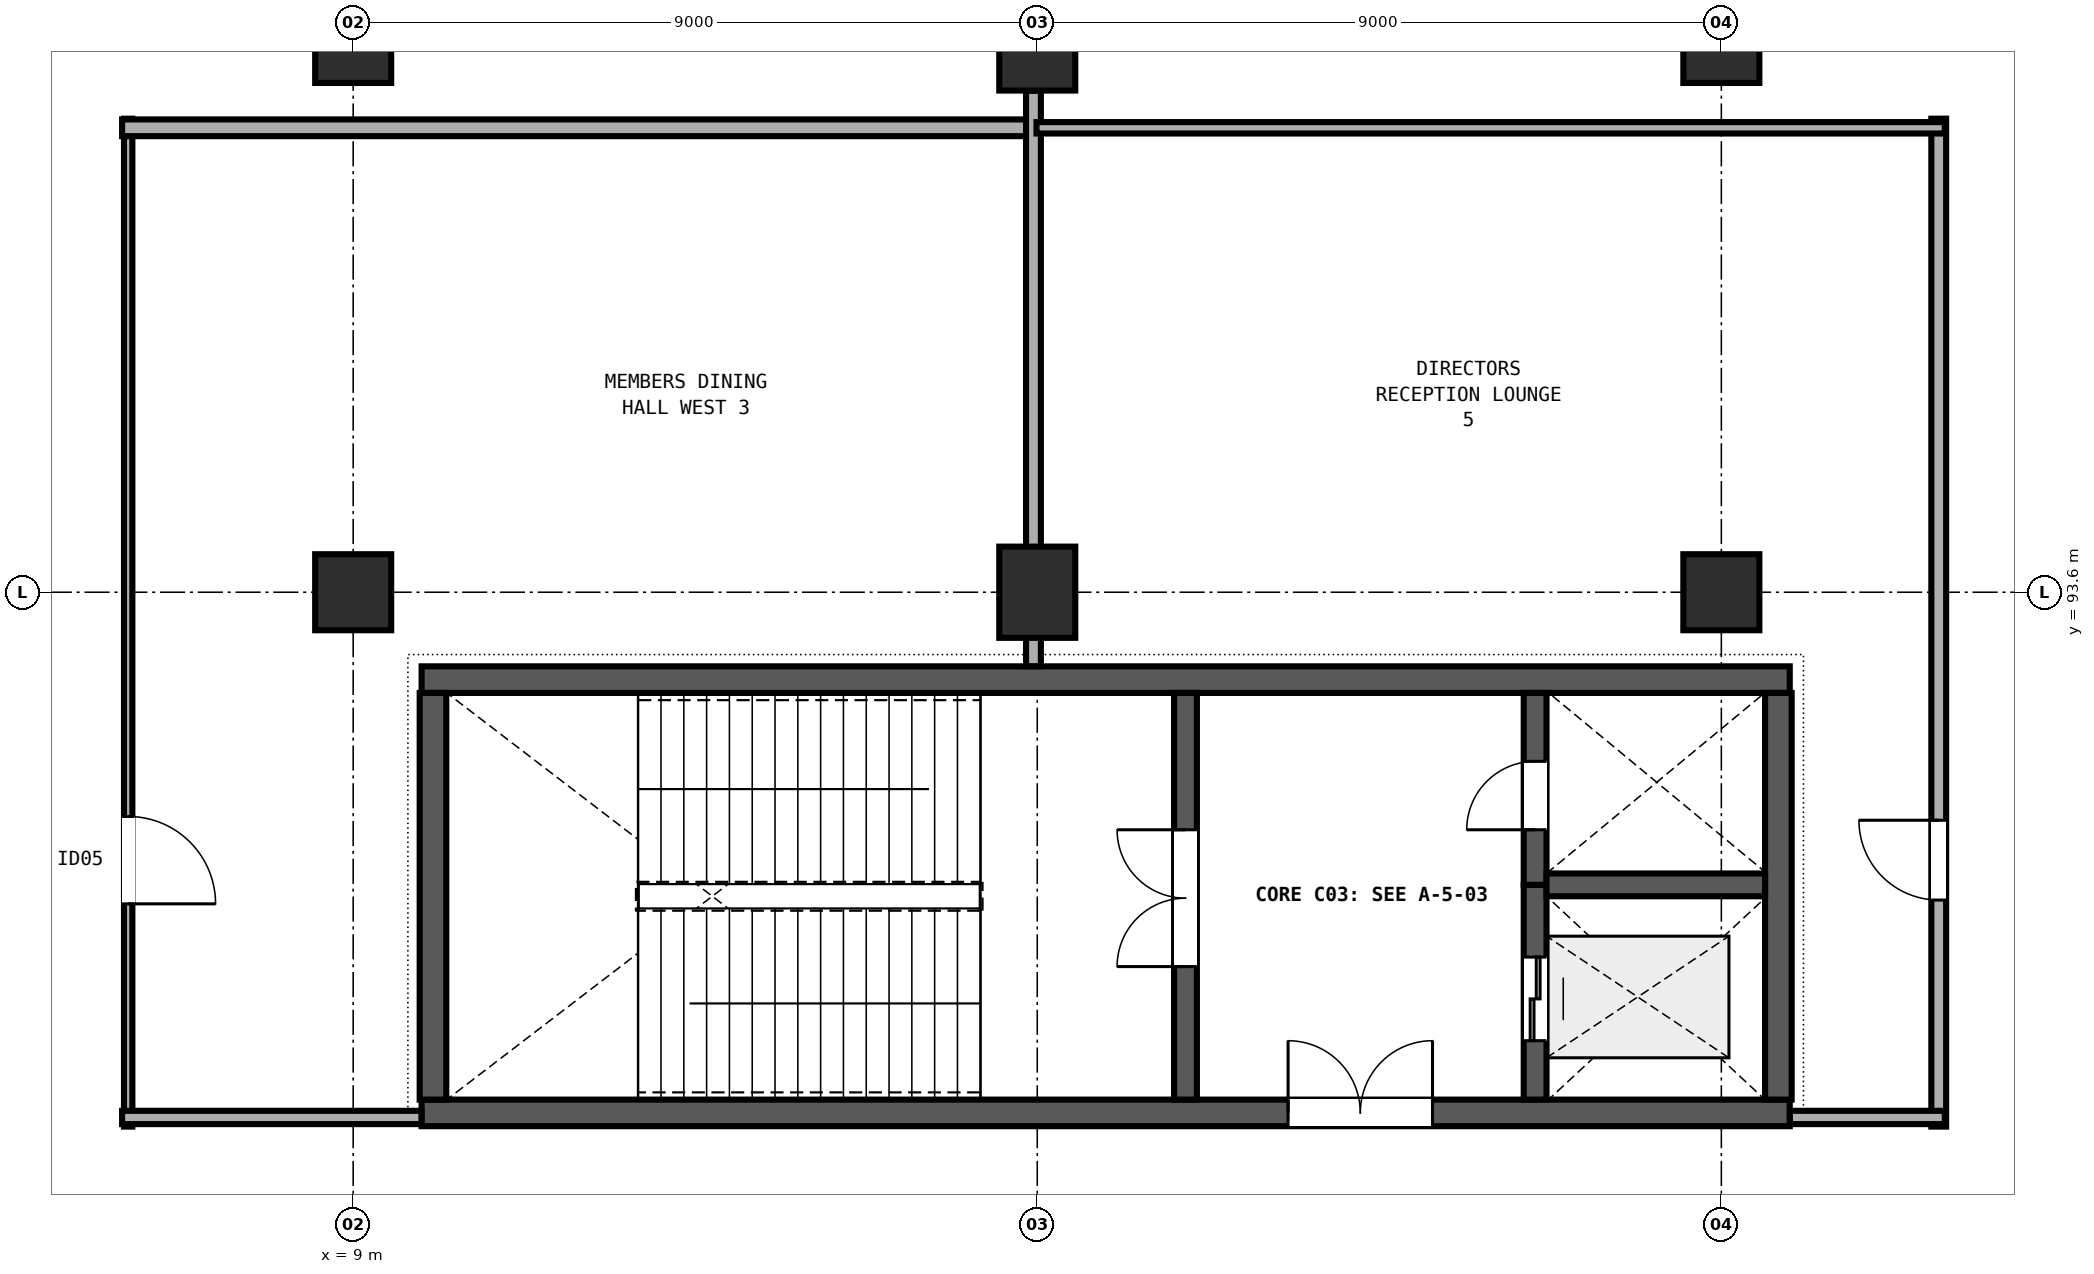
"""IFC4 building model, lengths in metres.
Left out: names, types, materials, properties, quantities, classifications, styles, units other than length and angle.
Written with IfcOpenShell. Run it as: python <this file> out.ifc"""

import sys

from ifc_helpers import new_model, si_unit, direction, frame, frame_2d, origin, origin_2d, place, context, subcontext, project, spatial, rectangle, extrude, element, fill, save


model = new_model("IFC4")
c1 = context("Model", 3, precision=1e-05, world=origin(), true_north=direction((0.0, 1.0)))
c2 = subcontext(c1, "Body", "Model", "MODEL_VIEW")
j1 = project(units=[si_unit("LENGTHUNIT", "METRE"), si_unit("PLANEANGLEUNIT", "RADIAN")], contexts=[c1])
p1 = place(None, origin())
s1 = spatial("IfcSite", under=j1, at=p1, CompositionType="ELEMENT")
p2 = place(p1, origin())
s2 = spatial("IfcBuilding", under=s1, at=p2, CompositionType="ELEMENT")
p3 = place(p2, frame((0.0, 0.0, 9.6)))
s3 = spatial("IfcBuildingStorey", under=s2, at=p3, CompositionType="ELEMENT", Elevation=9.6)
for number, where, z_axis, x_axis in (
    (1, (9.0, 93.6, 0.0), (0.0, 0.0, 1.0), (1.0, 0.0, 0.0)),
    (2, (9.0, 100.8, 0.0), (0.0, 0.0, 1.0), (1.0, 0.0, 0.0)),
):
    element("IfcColumn", number, at=place(p3, frame(where, z_axis=z_axis, x_axis=x_axis)), inside=s3, PredefinedType="COLUMN", context=c2, shape_type="SweptSolid", body=[
        extrude(rectangle(XDim=1.0, YDim=1.0, at=origin_2d()), origin(), (0.0, 0.0, 1.0), 4.8),
    ])
for number, where, z_axis, x_axis in (
    (3, (18.0, 93.6, 0.0), (0.0, 0.0, 1.0), (1.0, 0.0, 0.0)),
    (4, (18.0, 100.8, 0.0), (0.0, 0.0, 1.0), (1.0, 0.0, 0.0)),
):
    element("IfcColumn", number, at=place(p3, frame(where, z_axis=z_axis, x_axis=x_axis)), inside=s3, PredefinedType="COLUMN", context=c2, shape_type="SweptSolid", body=[
        extrude(rectangle(XDim=1.0, YDim=1.2, at=origin_2d()), origin(), (0.0, 0.0, 1.0), 4.8),
    ])
for number, where, z_axis, x_axis in (
    (5, (27.0, 93.6, 0.0), (0.0, 0.0, 1.0), (1.0, 0.0, 0.0)),
    (6, (27.0, 100.8, 0.0), (0.0, 0.0, 1.0), (1.0, 0.0, 0.0)),
):
    element("IfcColumn", number, at=place(p3, frame(where, z_axis=z_axis, x_axis=x_axis)), inside=s3, PredefinedType="COLUMN", context=c2, shape_type="SweptSolid", body=[
        extrude(rectangle(XDim=1.0, YDim=1.0, at=origin_2d()), origin(), (0.0, 0.0, 1.0), 4.8),
    ])
p4 = place(p3, frame((9.9, 86.75, 0.0), z_axis=(0.0, 0.0, 1.0), x_axis=(1.0, 0.0, 0.0)))
e7 = element("IfcWall", 7, at=p4, inside=s3, PredefinedType="SHEAR", context=c2, shape_type="SweptSolid", body=[
    extrude(rectangle(XDim=18.0, YDim=0.35, at=frame_2d((9.0, 0.0))), origin(), (0.0, 0.0, 1.0), 4.5),
])
p5 = place(p4, frame((11.4, 0.0, 0.0)))
e8 = element("IfcOpeningElement", 8, at=p5, cuts=e7, PredefinedType="OPENING", context=c2, shape_type="SweptSolid", body=[
    extrude(rectangle(XDim=1.9, YDim=2.25, at=frame_2d((0.95, 1.125))), frame((0.0, 0.185, 0.0), z_axis=(0.0, -1.0, 0.0), x_axis=(1.0, 0.0, 0.0)), (0.0, 0.0, 1.0), 0.37),
])
p6 = place(p3, frame((27.9, 92.45, 0.0), z_axis=(0.0, 0.0, 1.0), x_axis=(-1.0, 0.0, 0.0)))
e9 = element("IfcWall", 9, at=p6, inside=s3, PredefinedType="SHEAR", context=c2, shape_type="SweptSolid", body=[
    extrude(rectangle(XDim=18.0, YDim=0.35, at=frame_2d((9.0, 0.0))), origin(), (0.0, 0.0, 1.0), 4.5),
])
for number, where, z_axis, x_axis in (
    (10, (10.05, 92.275, 0.0), (0.0, 0.0, 1.0), (0.0, -1.0, 0.0)),
    (11, (27.75, 86.925, 0.0), (0.0, 0.0, 1.0), (0.0, 1.0, 0.0)),
):
    element("IfcWall", number, at=place(p3, frame(where, z_axis=z_axis, x_axis=x_axis)), inside=s3, PredefinedType="SHEAR", context=c2, shape_type="SweptSolid", body=[
        extrude(rectangle(XDim=5.35, YDim=0.35, at=frame_2d((2.675, 0.0))), origin(), (0.0, 0.0, 1.0), 4.5),
    ])
p7 = place(p3, frame((19.95, 86.925, 0.0), z_axis=(0.0, 0.0, 1.0), x_axis=(0.0, 1.0, 0.0)))
e12 = element("IfcWall", 12, at=p7, inside=s3, PredefinedType="SHEAR", context=c2, shape_type="SweptSolid", body=[
    extrude(rectangle(XDim=5.35, YDim=0.3, at=frame_2d((2.675, 0.0))), origin(), (0.0, 0.0, 1.0), 4.5),
])
p8 = place(p7, frame((1.75, 0.0, 0.0)))
e13 = element("IfcOpeningElement", 13, at=p8, cuts=e12, PredefinedType="OPENING", context=c2, shape_type="SweptSolid", body=[
    extrude(rectangle(XDim=1.8, YDim=2.25, at=frame_2d((0.9, 1.125))), frame((0.0, 0.16, 0.0), z_axis=(0.0, -1.0, 0.0), x_axis=(1.0, 0.0, 0.0)), (0.0, 0.0, 1.0), 0.32),
])
p9 = place(p3, frame((24.55, 86.925, 0.0), z_axis=(0.0, 0.0, 1.0), x_axis=(0.0, 1.0, 0.0)))
e14 = element("IfcWall", 14, at=p9, inside=s3, PredefinedType="SHEAR", context=c2, shape_type="SweptSolid", body=[
    extrude(rectangle(XDim=2.825, YDim=0.3, at=frame_2d((1.413, 0.0))), origin(), (0.0, 0.0, 1.0), 4.5),
])
p10 = place(p9, frame((0.775, 0.0, 0.0)))
e15 = element("IfcOpeningElement", 15, at=p10, cuts=e14, PredefinedType="OPENING", context=c2, shape_type="SweptSolid", body=[
    extrude(rectangle(XDim=1.1, YDim=2.1, at=frame_2d((0.55, 1.05))), frame((0.0, 0.16, 0.0), z_axis=(0.0, -1.0, 0.0), x_axis=(1.0, 0.0, 0.0)), (0.0, 0.0, 1.0), 0.32),
])
p11 = place(p3, frame((24.55, 89.75, 0.0), z_axis=(0.0, 0.0, 1.0), x_axis=(0.0, 1.0, 0.0)))
e16 = element("IfcWall", 16, at=p11, inside=s3, PredefinedType="SHEAR", context=c2, shape_type="SweptSolid", body=[
    extrude(rectangle(XDim=2.525, YDim=0.3, at=frame_2d((1.262, 0.0))), origin(), (0.0, 0.0, 1.0), 4.5),
])
p12 = place(p11, frame((0.725, 0.0, 0.0)))
e17 = element("IfcOpeningElement", 17, at=p12, cuts=e16, PredefinedType="OPENING", context=c2, shape_type="SweptSolid", body=[
    extrude(rectangle(XDim=0.9, YDim=2.1, at=frame_2d((0.45, 1.05))), frame((0.0, 0.16, 0.0), z_axis=(0.0, -1.0, 0.0), x_axis=(1.0, 0.0, 0.0)), (0.0, 0.0, 1.0), 0.32),
])
p13 = place(p3, frame((24.7, 89.75, 0.0), z_axis=(0.0, 0.0, 1.0), x_axis=(1.0, 0.0, 0.0)))
e18 = element("IfcWall", 18, at=p13, inside=s3, PredefinedType="SHEAR", context=c2, shape_type="SweptSolid", body=[
    extrude(rectangle(XDim=2.875, YDim=0.3, at=frame_2d((1.438, 0.0))), origin(), (0.0, 0.0, 1.0), 4.5),
])
p14 = place(p3, frame((6.04, 99.83, 0.0), z_axis=(0.0, 0.0, 1.0), x_axis=(0.0, -1.0, 0.0)))
e19 = element("IfcWall", 19, at=p14, inside=s3, PredefinedType="PARTITIONING", context=c2, shape_type="SweptSolid", body=[
    extrude(rectangle(XDim=13.26, YDim=0.11, at=frame_2d((6.63, 0.0))), origin(), (0.0, 0.0, 1.0), 3.56),
])
p15 = place(p14, frame((9.18, 0.0, 0.0)))
e20 = element("IfcOpeningElement", 20, at=p15, cuts=e19, PredefinedType="OPENING", context=c2, shape_type="SweptSolid", body=[
    extrude(rectangle(XDim=1.15, YDim=2.15, at=frame_2d((0.575, 1.075))), frame((0.0, 0.065, 0.0), z_axis=(0.0, -1.0, 0.0), x_axis=(1.0, 0.0, 0.0)), (0.0, 0.0, 1.0), 0.13),
])
p16 = place(p3, frame((5.96, 99.71, 0.0), z_axis=(0.0, 0.0, 1.0), x_axis=(1.0, 0.0, 0.0)))
e21 = element("IfcWall", 21, at=p16, inside=s3, PredefinedType="PARTITIONING", context=c2, shape_type="SweptSolid", body=[
    extrude(rectangle(XDim=11.95, YDim=0.22, at=frame_2d((5.975, 0.0))), origin(), (0.0, 0.0, 1.0), 3.56),
])
p17 = place(p3, frame((17.95, 100.198, 0.0), z_axis=(0.0, 0.0, 1.0), x_axis=(0.0, -1.0, 0.0)))
e22 = element("IfcWall", 22, at=p17, inside=s3, PredefinedType="PARTITIONING", context=c2, shape_type="SweptSolid", body=[
    extrude(rectangle(XDim=7.571, YDim=0.195, at=frame_2d((3.786, 0.0))), origin(), (0.0, 0.0, 1.0), 3.56),
])
p18 = place(p3, frame((9.898, 86.69, 0.0), z_axis=(0.0, 0.0, 1.0), x_axis=(-1.0, 0.0, 0.0)))
e23 = element("IfcWall", 23, at=p18, inside=s3, PredefinedType="PARTITIONING", context=c2, shape_type="SweptSolid", body=[
    extrude(rectangle(XDim=3.938, YDim=0.175, at=frame_2d((1.969, 0.0))), origin(), (0.0, 0.0, 1.0), 3.56),
])
p19 = place(p3, frame((29.86, 86.57, 0.0), z_axis=(0.0, 0.0, 1.0), x_axis=(0.0, 1.0, 0.0)))
e24 = element("IfcWall", 24, at=p19, inside=s3, PredefinedType="PARTITIONING", context=c2, shape_type="SweptSolid", body=[
    extrude(rectangle(XDim=13.26, YDim=0.195, at=frame_2d((6.63, 0.0))), origin(), (0.0, 0.0, 1.0), 3.56),
])
p20 = place(p19, frame((2.98, 0.0, 0.0)))
e25 = element("IfcOpeningElement", 25, at=p20, cuts=e24, PredefinedType="OPENING", context=c2, shape_type="SweptSolid", body=[
    extrude(rectangle(XDim=1.05, YDim=2.1, at=frame_2d((0.525, 1.05))), frame((0.0, 0.107, 0.0), z_axis=(0.0, -1.0, 0.0), x_axis=(1.0, 0.0, 0.0)), (0.0, 0.0, 1.0), 0.215),
])
p21 = place(p3, frame((29.94, 86.69, 0.0), z_axis=(0.0, 0.0, 1.0), x_axis=(-1.0, 0.0, 0.0)))
e26 = element("IfcWall", 26, at=p21, inside=s3, PredefinedType="PARTITIONING", context=c2, shape_type="SweptSolid", body=[
    extrude(rectangle(XDim=2.038, YDim=0.175, at=frame_2d((1.019, 0.0))), origin(), (0.0, 0.0, 1.0), 3.56),
])
p22 = place(p3, frame((17.99, 99.71, 0.0), z_axis=(0.0, 0.0, 1.0), x_axis=(1.0, 0.0, 0.0)))
e27 = element("IfcWall", 27, at=p22, inside=s3, PredefinedType="PARTITIONING", context=c2, shape_type="SweptSolid", body=[
    extrude(rectangle(XDim=11.95, YDim=0.15, at=frame_2d((5.975, 0.0))), origin(), (0.0, 0.0, 1.0), 3.56),
])
p23 = place(p8, origin())
e28 = element("IfcDoor", 28, at=p23, inside=s3, OperationType="DOUBLE_DOOR_SINGLE_SWING", PredefinedType="DOOR", context=c2, shape_type="SweptSolid", body=[
    extrude(rectangle(XDim=1.8, YDim=2.25, at=frame_2d((0.9, 1.125))), frame((0.0, 0.025, 0.0), z_axis=(0.0, -1.0, 0.0), x_axis=(1.0, 0.0, 0.0)), (0.0, 0.0, 1.0), 0.05),
])
fill(e13, e28)
p24 = place(p12, origin())
e29 = element("IfcDoor", 29, at=p24, inside=s3, OperationType="SINGLE_SWING_LEFT", PredefinedType="DOOR", context=c2, shape_type="SweptSolid", body=[
    extrude(rectangle(XDim=0.9, YDim=2.1, at=frame_2d((0.45, 1.05))), frame((0.0, 0.025, 0.0), z_axis=(0.0, -1.0, 0.0), x_axis=(1.0, 0.0, 0.0)), (0.0, 0.0, 1.0), 0.05),
])
fill(e17, e29)
p25 = place(p10, origin())
e30 = element("IfcDoor", 30, at=p25, inside=s3, OperationType="DOUBLE_DOOR_SLIDING", PredefinedType="DOOR", context=c2, shape_type="SweptSolid", body=[
    extrude(rectangle(XDim=1.1, YDim=2.1, at=frame_2d((0.55, 1.05))), frame((0.0, 0.025, 0.0), z_axis=(0.0, -1.0, 0.0), x_axis=(1.0, 0.0, 0.0)), (0.0, 0.0, 1.0), 0.05),
])
fill(e15, e30)
p26 = place(p5, origin())
e31 = element("IfcDoor", 31, at=p26, inside=s3, OperationType="DOUBLE_DOOR_SINGLE_SWING", PredefinedType="DOOR", context=c2, shape_type="SweptSolid", body=[
    extrude(rectangle(XDim=1.9, YDim=2.25, at=frame_2d((0.95, 1.125))), frame((0.0, 0.025, 0.0), z_axis=(0.0, -1.0, 0.0), x_axis=(1.0, 0.0, 0.0)), (0.0, 0.0, 1.0), 0.05),
])
fill(e8, e31)
p27 = place(p15, origin())
e32 = element("IfcDoor", 32, at=p27, inside=s3, OperationType="SINGLE_SWING_RIGHT", PredefinedType="DOOR", context=c2, shape_type="SweptSolid", body=[
    extrude(rectangle(XDim=1.15, YDim=2.15, at=frame_2d((0.575, 1.075))), frame((0.0, 0.025, 0.0), z_axis=(0.0, -1.0, 0.0), x_axis=(1.0, 0.0, 0.0)), (0.0, 0.0, 1.0), 0.05),
])
fill(e20, e32)
p28 = place(p20, origin())
e33 = element("IfcDoor", 33, at=p28, inside=s3, OperationType="SINGLE_SWING_RIGHT", PredefinedType="DOOR", context=c2, shape_type="SweptSolid", body=[
    extrude(rectangle(XDim=1.05, YDim=2.1, at=frame_2d((0.525, 1.05))), frame((0.0, 0.025, 0.0), z_axis=(0.0, -1.0, 0.0), x_axis=(1.0, 0.0, 0.0)), (0.0, 0.0, 1.0), 0.05),
])
fill(e25, e33)
save(model, sys.argv[1])
